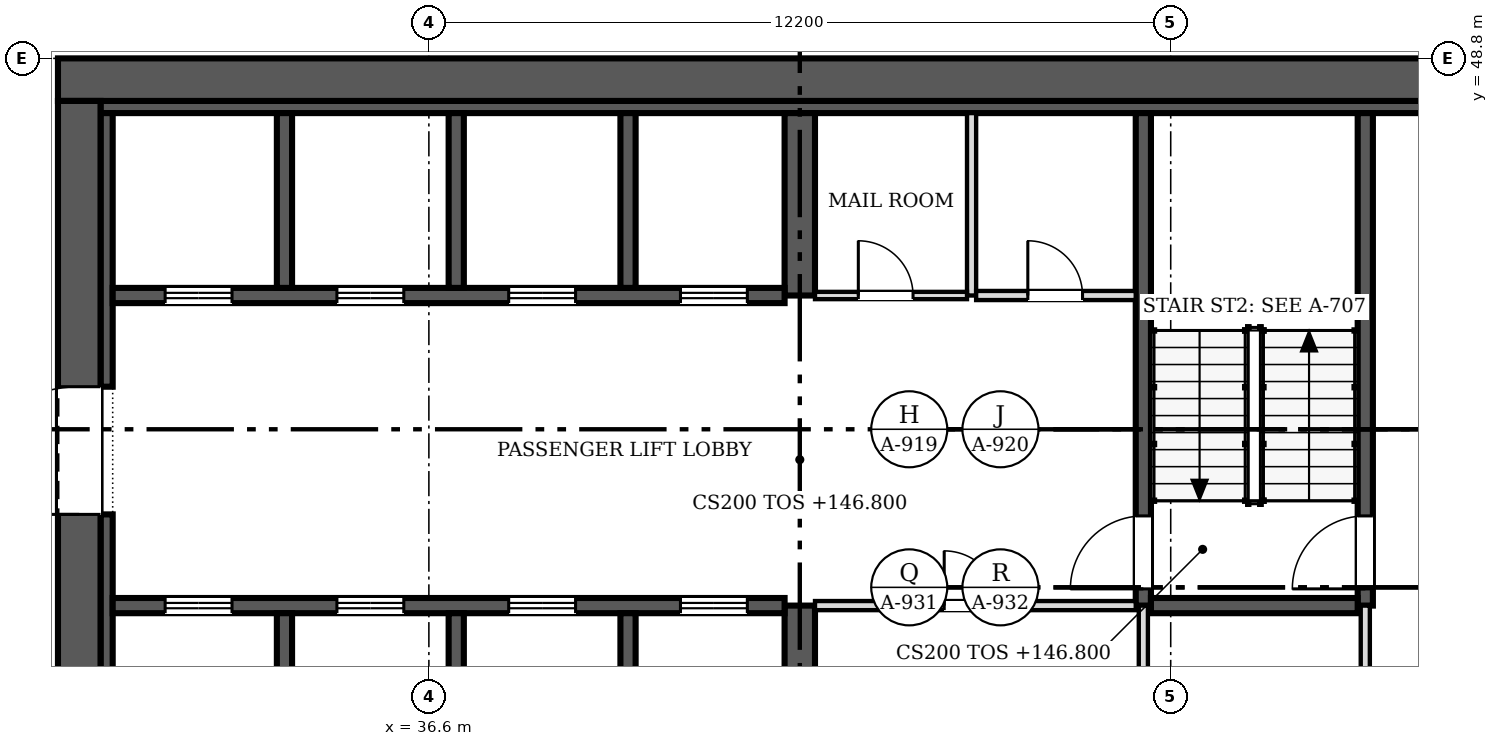
"""IFC4 building model, lengths in metres.
Left out: names, types, materials, properties, quantities, classifications, styles, units other than length and angle.
Written with IfcOpenShell. Run it as: python <this file> out.ifc"""

import sys

from ifc_helpers import new_model, si_unit, direction, frame, frame_2d, origin, place, context, subcontext, project, spatial, rectangle, extrude, source, transform, mapped, element, fill, save


model = new_model("IFC4")
c1 = context("Model", 3, precision=1e-05, world=origin(), true_north=direction((0.0, 1.0)))
c2 = subcontext(c1, "Body", "Model", "MODEL_VIEW")
j1 = project(units=[si_unit("LENGTHUNIT", "METRE"), si_unit("PLANEANGLEUNIT", "RADIAN")], contexts=[c1])
p1 = place(None, origin())
s1 = spatial("IfcSite", under=j1, at=p1, CompositionType="ELEMENT")
p2 = place(p1, origin())
s2 = spatial("IfcBuilding", under=s1, at=p2, CompositionType="ELEMENT")
p3 = place(p2, frame((0.0, 0.0, 146.8)))
s3 = spatial("IfcBuildingStorey", under=s2, at=p3, CompositionType="ELEMENT", Elevation=146.8)
p4 = place(p3, frame((30.85, 25.1, 0.0), z_axis=(0.0, 0.0, 1.0), x_axis=(0.0, 1.0, 0.0)))
e1 = element("IfcWall", 1, at=p4, inside=s3, PredefinedType="SHEAR", context=c2, shape_type="SweptSolid", body=[
    extrude(rectangle(XDim=23.0, YDim=0.7, at=frame_2d((11.5, 0.0))), origin(), (0.0, 0.0, 1.0), 3.8),
])
m1 = source(origin(), c2, "Body", "SweptSolid", [
    extrude(rectangle(XDim=2.1, YDim=2.4, at=frame_2d((1.05, 1.2))), frame((0.0, 0.36, 0.0), z_axis=(0.0, -1.0, 0.0), x_axis=(1.0, 0.0, 0.0)), (0.0, 0.0, 1.0), 0.72),
])
p5 = place(p4, frame((4.7, 0.0, 0.0)))
e2 = element("IfcOpeningElement", 2, at=p5, cuts=e1, PredefinedType="OPENING", context=c2, shape_type="MappedRepresentation", body=[
    mapped(m1, transform((0.0, 0.0, 0.0), scale=1.0)),
])
p6 = place(p4, frame((16.2, 0.0, 0.0)))
e3 = element("IfcOpeningElement", 3, at=p6, cuts=e1, PredefinedType="OPENING", context=c2, shape_type="MappedRepresentation", body=[
    mapped(m1, transform((0.0, 0.0, 0.0), scale=1.0)),
])
p7 = place(p3, frame((30.5, 48.45, 0.0), z_axis=(0.0, 0.0, 1.0), x_axis=(1.0, 0.0, 0.0)))
e4 = element("IfcWall", 4, at=p7, inside=s3, PredefinedType="SHEAR", context=c2, shape_type="SweptSolid", body=[
    extrude(rectangle(XDim=24.4, YDim=0.7, at=frame_2d((12.2, 0.0))), origin(), (0.0, 0.0, 1.0), 3.8),
])
p8 = place(p3, frame((31.2, 48.0, 0.0), z_axis=(0.0, 0.0, 1.0), x_axis=(1.0, 0.0, 0.0)))
e5 = element("IfcWall", 5, at=p8, inside=s3, PredefinedType="SOLIDWALL", context=c2, shape_type="SweptSolid", body=[
    extrude(rectangle(XDim=23.0, YDim=0.2, at=frame_2d((11.5, 0.0))), origin(), (0.0, 0.0, 1.0), 3.8),
])
p9 = place(p3, frame((31.3, 31.9, 0.0), z_axis=(0.0, 0.0, 1.0), x_axis=(0.0, 1.0, 0.0)))
e6 = element("IfcWall", 6, at=p9, inside=s3, PredefinedType="SOLIDWALL", context=c2, shape_type="SweptSolid", body=[
    extrude(rectangle(XDim=9.4, YDim=0.2, at=frame_2d((4.7, 0.0))), origin(), (0.0, 0.0, 1.0), 3.8),
])
p10 = place(p3, frame((31.3, 43.4, 0.0), z_axis=(0.0, 0.0, 1.0), x_axis=(0.0, 1.0, 0.0)))
e7 = element("IfcWall", 7, at=p10, inside=s3, PredefinedType="SOLIDWALL", context=c2, shape_type="SweptSolid", body=[
    extrude(rectangle(XDim=4.5, YDim=0.2, at=frame_2d((2.25, 0.0))), origin(), (0.0, 0.0, 1.0), 3.8),
])
p11 = place(p3, frame((42.7, 36.85, 0.0), z_axis=(0.0, 0.0, 1.0), x_axis=(0.0, 1.0, 0.0)))
e8 = element("IfcWall", 8, at=p11, inside=s3, PredefinedType="SHEAR", context=c2, shape_type="SweptSolid", body=[
    extrude(rectangle(XDim=2.95, YDim=0.5, at=frame_2d((1.475, 0.0))), origin(), (0.0, 0.0, 1.0), 3.8),
])
p12 = place(p3, frame((42.7, 44.9, 0.0), z_axis=(0.0, 0.0, 1.0), x_axis=(0.0, 1.0, 0.0)))
e9 = element("IfcWall", 9, at=p12, inside=s3, PredefinedType="SHEAR", context=c2, shape_type="SweptSolid", body=[
    extrude(rectangle(XDim=3.0, YDim=0.5, at=frame_2d((1.5, 0.0))), origin(), (0.0, 0.0, 1.0), 3.8),
])
p13 = place(p3, frame((31.4, 39.8, 0.0), z_axis=(0.0, 0.0, 1.0), x_axis=(1.0, 0.0, 0.0)))
e10 = element("IfcWall", 10, at=p13, inside=s3, PredefinedType="SOLIDWALL", context=c2, shape_type="SweptSolid", body=[
    extrude(rectangle(XDim=11.05, YDim=0.25, at=frame_2d((5.525, 0.0))), origin(), (0.0, 0.0, 1.0), 3.8),
])
m2 = source(origin(), c2, "Body", "SweptSolid", [
    extrude(rectangle(XDim=1.1, YDim=2.1, at=frame_2d((0.55, 1.05))), frame((0.0, 0.135, 0.0), z_axis=(0.0, -1.0, 0.0), x_axis=(1.0, 0.0, 0.0)), (0.0, 0.0, 1.0), 0.27),
])
p14 = place(p13, frame((0.863, 0.0, 0.0)))
e11 = element("IfcOpeningElement", 11, at=p14, cuts=e10, PredefinedType="OPENING", context=c2, shape_type="MappedRepresentation", body=[
    mapped(m2, transform((0.0, 0.0, 0.0), scale=1.0)),
])
p15 = place(p13, frame((3.688, 0.0, 0.0)))
e12 = element("IfcOpeningElement", 12, at=p15, cuts=e10, PredefinedType="OPENING", context=c2, shape_type="MappedRepresentation", body=[
    mapped(m2, transform((0.0, 0.0, 0.0), scale=1.0)),
])
p16 = place(p13, frame((6.512, 0.0, 0.0)))
e13 = element("IfcOpeningElement", 13, at=p16, cuts=e10, PredefinedType="OPENING", context=c2, shape_type="MappedRepresentation", body=[
    mapped(m2, transform((0.0, 0.0, 0.0), scale=1.0)),
])
p17 = place(p13, frame((9.337, 0.0, 0.0)))
e14 = element("IfcOpeningElement", 14, at=p17, cuts=e10, PredefinedType="OPENING", context=c2, shape_type="MappedRepresentation", body=[
    mapped(m2, transform((0.0, 0.0, 0.0), scale=1.0)),
])
p18 = place(p3, frame((42.45, 44.9, 0.0), z_axis=(0.0, 0.0, 1.0), x_axis=(-1.0, 0.0, 0.0)))
e15 = element("IfcWall", 15, at=p18, inside=s3, PredefinedType="SOLIDWALL", context=c2, shape_type="SweptSolid", body=[
    extrude(rectangle(XDim=11.05, YDim=0.25, at=frame_2d((5.525, 0.0))), origin(), (0.0, 0.0, 1.0), 3.8),
])
p19 = place(p18, frame((9.087, 0.0, 0.0)))
e16 = element("IfcOpeningElement", 16, at=p19, cuts=e15, PredefinedType="OPENING", context=c2, shape_type="MappedRepresentation", body=[
    mapped(m2, transform((0.0, 0.0, 0.0), scale=1.0)),
])
p20 = place(p18, frame((6.262, 0.0, 0.0)))
e17 = element("IfcOpeningElement", 17, at=p20, cuts=e15, PredefinedType="OPENING", context=c2, shape_type="MappedRepresentation", body=[
    mapped(m2, transform((0.0, 0.0, 0.0), scale=1.0)),
])
p21 = place(p18, frame((3.438, 0.0, 0.0)))
e18 = element("IfcOpeningElement", 18, at=p21, cuts=e15, PredefinedType="OPENING", context=c2, shape_type="MappedRepresentation", body=[
    mapped(m2, transform((0.0, 0.0, 0.0), scale=1.0)),
])
p22 = place(p18, frame((0.613, 0.0, 0.0)))
e19 = element("IfcOpeningElement", 19, at=p22, cuts=e15, PredefinedType="OPENING", context=c2, shape_type="MappedRepresentation", body=[
    mapped(m2, transform((0.0, 0.0, 0.0), scale=1.0)),
])
p23 = place(p3, frame((48.35, 47.9, 0.0), z_axis=(0.0, 0.0, 1.0), x_axis=(0.0, -1.0, 0.0)))
e20 = element("IfcWall", 20, at=p23, inside=s3, PredefinedType="SOLIDWALL", context=c2, shape_type="SweptSolid", body=[
    extrude(rectangle(XDim=8.1, YDim=0.25, at=frame_2d((4.05, 0.0))), origin(), (0.0, 0.0, 1.0), 3.8),
])
m3 = source(origin(), c2, "Body", "SweptSolid", [
    extrude(rectangle(XDim=1.2, YDim=2.1, at=frame_2d((0.6, 1.05))), frame((0.0, 0.135, 0.0), z_axis=(0.0, -1.0, 0.0), x_axis=(1.0, 0.0, 0.0)), (0.0, 0.0, 1.0), 0.27),
])
p24 = place(p23, frame((6.625, 0.0, 0.0)))
e21 = element("IfcOpeningElement", 21, at=p24, cuts=e20, PredefinedType="OPENING", context=c2, shape_type="MappedRepresentation", body=[
    mapped(m3, transform((0.0, 0.0, 0.0), scale=1.0)),
])
p25 = place(p3, frame((52.0, 39.8, 0.0), z_axis=(0.0, 0.0, 1.0), x_axis=(0.0, 1.0, 0.0)))
e22 = element("IfcWall", 22, at=p25, inside=s3, PredefinedType="SOLIDWALL", context=c2, shape_type="SweptSolid", body=[
    extrude(rectangle(XDim=8.1, YDim=0.25, at=frame_2d((4.05, 0.0))), origin(), (0.0, 0.0, 1.0), 3.8),
])
p26 = place(p25, frame((0.275, 0.0, 0.0)))
e23 = element("IfcOpeningElement", 23, at=p26, cuts=e22, PredefinedType="OPENING", context=c2, shape_type="MappedRepresentation", body=[
    mapped(m3, transform((0.0, 0.0, 0.0), scale=1.0)),
])
p27 = place(p3, frame((48.475, 39.8, 0.0), z_axis=(0.0, 0.0, 1.0), x_axis=(1.0, 0.0, 0.0)))
e24 = element("IfcWall", 24, at=p27, inside=s3, PredefinedType="SOLIDWALL", context=c2, shape_type="SweptSolid", body=[
    extrude(rectangle(XDim=3.4, YDim=0.25, at=frame_2d((1.7, 0.0))), origin(), (0.0, 0.0, 1.0), 3.8),
])
for number, where, z_axis, x_axis in (
    (25, (34.225, 36.85, 0.0), (0.0, 0.0, 1.0), (0.0, 1.0, 0.0)),
    (26, (37.05, 36.85, 0.0), (0.0, 0.0, 1.0), (0.0, 1.0, 0.0)),
    (27, (39.875, 36.85, 0.0), (0.0, 0.0, 1.0), (0.0, 1.0, 0.0)),
):
    element("IfcWall", number, at=place(p3, frame(where, z_axis=z_axis, x_axis=x_axis)), inside=s3, PredefinedType="SOLIDWALL", context=c2, shape_type="SweptSolid", body=[
        extrude(rectangle(XDim=2.825, YDim=0.25, at=frame_2d((1.413, 0.0))), origin(), (0.0, 0.0, 1.0), 3.8),
    ])
for number, where, z_axis, x_axis in (
    (28, (34.225, 45.025, 0.0), (0.0, 0.0, 1.0), (0.0, 1.0, 0.0)),
    (29, (37.05, 45.025, 0.0), (0.0, 0.0, 1.0), (0.0, 1.0, 0.0)),
    (30, (39.875, 45.025, 0.0), (0.0, 0.0, 1.0), (0.0, 1.0, 0.0)),
):
    element("IfcWall", number, at=place(p3, frame(where, z_axis=z_axis, x_axis=x_axis)), inside=s3, PredefinedType="SOLIDWALL", context=c2, shape_type="SweptSolid", body=[
        extrude(rectangle(XDim=2.875, YDim=0.25, at=frame_2d((1.438, 0.0))), origin(), (0.0, 0.0, 1.0), 3.8),
    ])
p28 = place(p3, frame((52.0, 33.525, 0.0), z_axis=(0.0, 0.0, 1.0), x_axis=(0.0, 1.0, 0.0)))
e31 = element("IfcWall", 31, at=p28, inside=s3, PredefinedType="PARTITIONING", context=c2, shape_type="SweptSolid", body=[
    extrude(rectangle(XDim=6.275, YDim=0.15, at=frame_2d((3.138, 0.0))), origin(), (0.0, 0.0, 1.0), 3.5),
])
m4 = source(origin(), c2, "Body", "SweptSolid", [
    extrude(rectangle(XDim=0.9, YDim=2.1, at=frame_2d((0.45, 1.05))), frame((0.0, 0.085, 0.0), z_axis=(0.0, -1.0, 0.0), x_axis=(1.0, 0.0, 0.0)), (0.0, 0.0, 1.0), 0.17),
])
p29 = place(p28, frame((1.025, 0.0, 0.0)))
e32 = element("IfcOpeningElement", 32, at=p29, cuts=e31, PredefinedType="OPENING", context=c2, shape_type="MappedRepresentation", body=[
    mapped(m4, transform((0.0, 0.0, 0.0), scale=1.0)),
])
p30 = place(p3, frame((48.225, 39.8, 0.0), z_axis=(0.0, 0.0, 1.0), x_axis=(-1.0, 0.0, 0.0)))
e33 = element("IfcWall", 33, at=p30, inside=s3, PredefinedType="PARTITIONING", context=c2, shape_type="SweptSolid", body=[
    extrude(rectangle(XDim=5.275, YDim=0.15, at=frame_2d((2.638, 0.0))), origin(), (0.0, 0.0, 1.0), 3.5),
])
p31 = place(p30, frame((2.25, 0.0, 0.0)))
e34 = element("IfcOpeningElement", 34, at=p31, cuts=e33, PredefinedType="OPENING", context=c2, shape_type="MappedRepresentation", body=[
    mapped(m4, transform((0.0, 0.0, 0.0), scale=1.0)),
])
p32 = place(p3, frame((48.35, 36.85, 0.0), z_axis=(0.0, 0.0, 1.0), x_axis=(0.0, 1.0, 0.0)))
e35 = element("IfcWall", 35, at=p32, inside=s3, PredefinedType="PARTITIONING", context=c2, shape_type="SweptSolid", body=[
    extrude(rectangle(XDim=2.95, YDim=0.15, at=frame_2d((1.475, 0.0))), origin(), (0.0, 0.0, 1.0), 3.5),
])
p33 = place(p3, frame((45.525, 44.9, 0.0), z_axis=(0.0, 0.0, 1.0), x_axis=(0.0, 1.0, 0.0)))
e36 = element("IfcWall", 36, at=p33, inside=s3, PredefinedType="PARTITIONING", context=c2, shape_type="SweptSolid", body=[
    extrude(rectangle(XDim=3.0, YDim=0.15, at=frame_2d((1.5, 0.0))), origin(), (0.0, 0.0, 1.0), 3.5),
])
p34 = place(p3, frame((42.95, 44.9, 0.0), z_axis=(0.0, 0.0, 1.0), x_axis=(1.0, 0.0, 0.0)))
e37 = element("IfcWall", 37, at=p34, inside=s3, PredefinedType="PARTITIONING", context=c2, shape_type="SweptSolid", body=[
    extrude(rectangle(XDim=2.5, YDim=0.12, at=frame_2d((1.25, 0.0))), origin(), (0.0, 0.0, 1.0), 3.5),
])
m5 = source(origin(), c2, "Body", "SweptSolid", [
    extrude(rectangle(XDim=0.9, YDim=2.1, at=frame_2d((0.45, 1.05))), frame((0.0, 0.07, 0.0), z_axis=(0.0, -1.0, 0.0), x_axis=(1.0, 0.0, 0.0)), (0.0, 0.0, 1.0), 0.14),
])
p35 = place(p34, frame((0.712, 0.0, 0.0)))
e38 = element("IfcOpeningElement", 38, at=p35, cuts=e37, PredefinedType="OPENING", context=c2, shape_type="MappedRepresentation", body=[
    mapped(m5, transform((0.0, 0.0, 0.0), scale=1.0)),
])
p36 = place(p3, frame((45.6, 44.9, 0.0), z_axis=(0.0, 0.0, 1.0), x_axis=(1.0, 0.0, 0.0)))
e39 = element("IfcWall", 39, at=p36, inside=s3, PredefinedType="PARTITIONING", context=c2, shape_type="SweptSolid", body=[
    extrude(rectangle(XDim=2.625, YDim=0.15, at=frame_2d((1.312, 0.0))), origin(), (0.0, 0.0, 1.0), 3.5),
])
p37 = place(p36, frame((0.85, 0.0, 0.0)))
e40 = element("IfcOpeningElement", 40, at=p37, cuts=e39, PredefinedType="OPENING", context=c2, shape_type="MappedRepresentation", body=[
    mapped(m4, transform((0.0, 0.0, 0.0), scale=1.0)),
])
m6 = source(origin(), c2, "Body", "SweptSolid", [
    extrude(rectangle(XDim=2.1, YDim=2.4, at=frame_2d((1.05, 1.2))), frame((0.0, 0.025, 0.0), z_axis=(0.0, -1.0, 0.0), x_axis=(1.0, 0.0, 0.0)), (0.0, 0.0, 1.0), 0.05),
])
p38 = place(p6, origin())
e41 = element("IfcDoor", 41, at=p38, inside=s3, OperationType="DOUBLE_DOOR_SINGLE_SWING", PredefinedType="DOOR", context=c2, shape_type="MappedRepresentation", body=[
    mapped(m6, transform((0.0, 0.0, 0.0), scale=1.0)),
])
fill(e3, e41)
m7 = source(origin(), c2, "Body", "SweptSolid", [
    extrude(rectangle(XDim=1.1, YDim=2.1, at=frame_2d((0.55, 1.05))), frame((0.0, 0.025, 0.0), z_axis=(0.0, -1.0, 0.0), x_axis=(1.0, 0.0, 0.0)), (0.0, 0.0, 1.0), 0.05),
])
p39 = place(p14, origin())
e42 = element("IfcDoor", 42, at=p39, inside=s3, OperationType="DOUBLE_DOOR_SLIDING", PredefinedType="DOOR", context=c2, shape_type="MappedRepresentation", body=[
    mapped(m7, transform((0.0, 0.0, 0.0), scale=1.0)),
])
fill(e11, e42)
p40 = place(p15, origin())
e43 = element("IfcDoor", 43, at=p40, inside=s3, OperationType="DOUBLE_DOOR_SLIDING", PredefinedType="DOOR", context=c2, shape_type="MappedRepresentation", body=[
    mapped(m7, transform((0.0, 0.0, 0.0), scale=1.0)),
])
fill(e12, e43)
p41 = place(p16, origin())
e44 = element("IfcDoor", 44, at=p41, inside=s3, OperationType="DOUBLE_DOOR_SLIDING", PredefinedType="DOOR", context=c2, shape_type="MappedRepresentation", body=[
    mapped(m7, transform((0.0, 0.0, 0.0), scale=1.0)),
])
fill(e13, e44)
p42 = place(p17, origin())
e45 = element("IfcDoor", 45, at=p42, inside=s3, OperationType="DOUBLE_DOOR_SLIDING", PredefinedType="DOOR", context=c2, shape_type="MappedRepresentation", body=[
    mapped(m7, transform((0.0, 0.0, 0.0), scale=1.0)),
])
fill(e14, e45)
p43 = place(p19, origin())
e46 = element("IfcDoor", 46, at=p43, inside=s3, OperationType="DOUBLE_DOOR_SLIDING", PredefinedType="DOOR", context=c2, shape_type="MappedRepresentation", body=[
    mapped(m7, transform((0.0, 0.0, 0.0), scale=1.0)),
])
fill(e16, e46)
p44 = place(p20, origin())
e47 = element("IfcDoor", 47, at=p44, inside=s3, OperationType="DOUBLE_DOOR_SLIDING", PredefinedType="DOOR", context=c2, shape_type="MappedRepresentation", body=[
    mapped(m7, transform((0.0, 0.0, 0.0), scale=1.0)),
])
fill(e17, e47)
p45 = place(p21, origin())
e48 = element("IfcDoor", 48, at=p45, inside=s3, OperationType="DOUBLE_DOOR_SLIDING", PredefinedType="DOOR", context=c2, shape_type="MappedRepresentation", body=[
    mapped(m7, transform((0.0, 0.0, 0.0), scale=1.0)),
])
fill(e18, e48)
p46 = place(p22, origin())
e49 = element("IfcDoor", 49, at=p46, inside=s3, OperationType="DOUBLE_DOOR_SLIDING", PredefinedType="DOOR", context=c2, shape_type="MappedRepresentation", body=[
    mapped(m7, transform((0.0, 0.0, 0.0), scale=1.0)),
])
fill(e19, e49)
m8 = source(origin(), c2, "Body", "SweptSolid", [
    extrude(rectangle(XDim=1.2, YDim=2.1, at=frame_2d((0.6, 1.05))), frame((0.0, 0.025, 0.0), z_axis=(0.0, -1.0, 0.0), x_axis=(1.0, 0.0, 0.0)), (0.0, 0.0, 1.0), 0.05),
])
p47 = place(p24, origin())
e50 = element("IfcDoor", 50, at=p47, inside=s3, OperationType="SINGLE_SWING_RIGHT", PredefinedType="DOOR", context=c2, shape_type="MappedRepresentation", body=[
    mapped(m8, transform((0.0, 0.0, 0.0), scale=1.0)),
])
fill(e21, e50)
p48 = place(p26, origin())
e51 = element("IfcDoor", 51, at=p48, inside=s3, OperationType="SINGLE_SWING_LEFT", PredefinedType="DOOR", context=c2, shape_type="MappedRepresentation", body=[
    mapped(m8, transform((0.0, 0.0, 0.0), scale=1.0)),
])
fill(e23, e51)
m9 = source(origin(), c2, "Body", "SweptSolid", [
    extrude(rectangle(XDim=0.9, YDim=2.1, at=frame_2d((0.45, 1.05))), frame((0.0, 0.025, 0.0), z_axis=(0.0, -1.0, 0.0), x_axis=(1.0, 0.0, 0.0)), (0.0, 0.0, 1.0), 0.05),
])
p49 = place(p31, origin())
e52 = element("IfcDoor", 52, at=p49, inside=s3, OperationType="SINGLE_SWING_RIGHT", PredefinedType="DOOR", context=c2, shape_type="MappedRepresentation", body=[
    mapped(m9, transform((0.0, 0.0, 0.0), scale=1.0)),
])
fill(e34, e52)
p50 = place(p35, origin())
e53 = element("IfcDoor", 53, at=p50, inside=s3, OperationType="SINGLE_SWING_LEFT", PredefinedType="DOOR", context=c2, shape_type="MappedRepresentation", body=[
    mapped(m9, transform((0.0, 0.0, 0.0), scale=1.0)),
])
fill(e38, e53)
p51 = place(p37, origin())
e54 = element("IfcDoor", 54, at=p51, inside=s3, OperationType="SINGLE_SWING_LEFT", PredefinedType="DOOR", context=c2, shape_type="MappedRepresentation", body=[
    mapped(m9, transform((0.0, 0.0, 0.0), scale=1.0)),
])
fill(e40, e54)
save(model, sys.argv[1])
